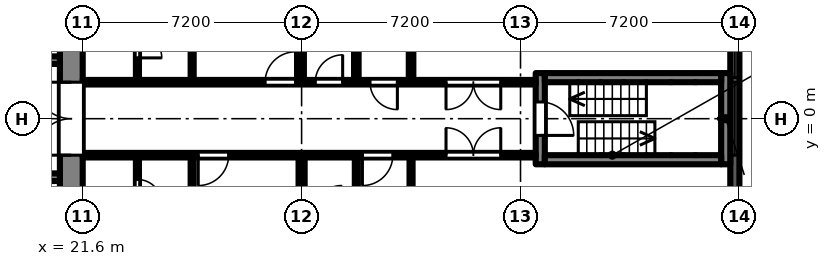
"""IFC4 building model, lengths in metres.
Left out: names, types, materials, properties, quantities, classifications, styles, units other than length and angle.
Written with IfcOpenShell. Run it as: python <this file> out.ifc"""

import sys

from ifc_helpers import new_model, si_unit, direction, frame, frame_2d, origin, place, context, subcontext, project, spatial, rectangle, extrude, element, fill, save


model = new_model("IFC4")
c1 = context("Model", 3, precision=1e-05, world=origin(), true_north=direction((0.0, 1.0)))
c2 = subcontext(c1, "Body", "Model", "MODEL_VIEW")
j1 = project(units=[si_unit("LENGTHUNIT", "METRE"), si_unit("PLANEANGLEUNIT", "RADIAN")], contexts=[c1])
p1 = place(None, origin())
s1 = spatial("IfcSite", under=j1, at=p1, CompositionType="ELEMENT")
p2 = place(p1, origin())
s2 = spatial("IfcBuilding", under=s1, at=p2, CompositionType="ELEMENT")
p3 = place(p2, frame((0.0, 0.0, 53.7)))
s3 = spatial("IfcBuildingStorey", under=s2, at=p3, CompositionType="ELEMENT", Elevation=53.7)
p4 = place(p3, frame((43.05, -2.7, 0.0), z_axis=(0.0, 0.0, 1.0), x_axis=(0.0, 1.0, 0.0)))
e1 = element("IfcWall", 1, at=p4, inside=s3, PredefinedType="SOLIDWALL", context=c2, shape_type="SweptSolid", body=[
    extrude(rectangle(XDim=5.4, YDim=0.3, at=frame_2d((2.7, 0.0))), origin(), (0.0, 0.0, 1.0), 2.1),
])
p5 = place(p4, frame((1.5, 0.0, 0.2)))
e2 = element("IfcOpeningElement", 2, at=p5, cuts=e1, PredefinedType="OPENING", context=c2, shape_type="SweptSolid", body=[
    extrude(rectangle(XDim=2.4, YDim=1.85, at=frame_2d((1.2, 0.925))), frame((0.0, 0.16, 0.0), z_axis=(0.0, -1.0, 0.0), x_axis=(1.0, 0.0, 0.0)), (0.0, 0.0, 1.0), 0.32),
])
p6 = place(p4, frame((4.05, 0.0, 0.2)))
e3 = element("IfcOpeningElement", 3, at=p6, cuts=e1, PredefinedType="OPENING", context=c2, shape_type="SweptSolid", body=[
    extrude(rectangle(XDim=1.2, YDim=1.85, at=frame_2d((0.6, 0.925))), frame((0.0, 0.16, 0.0), z_axis=(0.0, -1.0, 0.0), x_axis=(1.0, 0.0, 0.0)), (0.0, 0.0, 1.0), 0.32),
])
p7 = place(p3, frame((21.225, -7.2, 0.0), z_axis=(0.0, 0.0, 1.0), x_axis=(0.0, 1.0, 0.0)))
e4 = element("IfcWall", 4, at=p7, inside=s3, PredefinedType="SHEAR", context=c2, shape_type="SweptSolid", body=[
    extrude(rectangle(XDim=14.4, YDim=0.75, at=frame_2d((7.2, 0.0))), origin(), (0.0, 0.0, 1.0), 2.575),
])
p8 = place(p7, frame((6.0, 0.0, 0.0)))
e5 = element("IfcOpeningElement", 5, at=p8, cuts=e4, PredefinedType="OPENING", context=c2, shape_type="SweptSolid", body=[
    extrude(rectangle(XDim=2.4, YDim=2.2, at=frame_2d((1.2, 1.1))), frame((0.0, 0.385, 0.0), z_axis=(0.0, -1.0, 0.0), x_axis=(1.0, 0.0, 0.0)), (0.0, 0.0, 1.0), 0.77),
])
p9 = place(p3, frame((7.9, 1.925, 0.0), z_axis=(0.0, 0.0, 1.0), x_axis=(1.0, 0.0, 0.0)))
e6 = element("IfcWall", 6, at=p9, inside=s3, PredefinedType="SHEAR", context=c2, shape_type="SweptSolid", body=[
    extrude(rectangle(XDim=12.95, YDim=0.25, at=frame_2d((6.475, 0.0))), origin(), (0.0, 0.0, 1.0), 2.575),
])
p10 = place(p9, frame((0.525, 0.0, 0.0)))
e7 = element("IfcOpeningElement", 7, at=p10, cuts=e6, PredefinedType="OPENING", context=c2, shape_type="SweptSolid", body=[
    extrude(rectangle(XDim=0.9, YDim=2.1, at=frame_2d((0.45, 1.05))), frame((0.0, 0.135, 0.0), z_axis=(0.0, -1.0, 0.0), x_axis=(1.0, 0.0, 0.0)), (0.0, 0.0, 1.0), 0.27),
])
p11 = place(p9, frame((2.625, 0.0, 0.0)))
e8 = element("IfcOpeningElement", 8, at=p11, cuts=e6, PredefinedType="OPENING", context=c2, shape_type="SweptSolid", body=[
    extrude(rectangle(XDim=1.1, YDim=2.1, at=frame_2d((0.55, 1.05))), frame((0.0, 0.135, 0.0), z_axis=(0.0, -1.0, 0.0), x_axis=(1.0, 0.0, 0.0)), (0.0, 0.0, 1.0), 0.27),
])
p12 = place(p9, frame((6.025, 0.0, 0.0)))
e9 = element("IfcOpeningElement", 9, at=p12, cuts=e6, PredefinedType="OPENING", context=c2, shape_type="SweptSolid", body=[
    extrude(rectangle(XDim=0.9, YDim=2.1, at=frame_2d((0.45, 1.05))), frame((0.0, 0.135, 0.0), z_axis=(0.0, -1.0, 0.0), x_axis=(1.0, 0.0, 0.0)), (0.0, 0.0, 1.0), 0.27),
])
p13 = place(p9, frame((9.325, 0.0, 0.0)))
e10 = element("IfcOpeningElement", 10, at=p13, cuts=e6, PredefinedType="OPENING", context=c2, shape_type="SweptSolid", body=[
    extrude(rectangle(XDim=0.9, YDim=2.1, at=frame_2d((0.45, 1.05))), frame((0.0, 0.135, 0.0), z_axis=(0.0, -1.0, 0.0), x_axis=(1.0, 0.0, 0.0)), (0.0, 0.0, 1.0), 0.27),
])
p14 = place(p3, frame((7.9, -1.925, 0.0), z_axis=(0.0, 0.0, 1.0), x_axis=(1.0, 0.0, 0.0)))
e11 = element("IfcWall", 11, at=p14, inside=s3, PredefinedType="SHEAR", context=c2, shape_type="SweptSolid", body=[
    extrude(rectangle(XDim=12.95, YDim=0.25, at=frame_2d((6.475, 0.0))), origin(), (0.0, 0.0, 1.0), 2.575),
])
p15 = place(p14, frame((4.825, 0.0, 0.0)))
e12 = element("IfcOpeningElement", 12, at=p15, cuts=e11, PredefinedType="OPENING", context=c2, shape_type="SweptSolid", body=[
    extrude(rectangle(XDim=1.1, YDim=2.1, at=frame_2d((0.55, 1.05))), frame((0.0, 0.135, 0.0), z_axis=(0.0, -1.0, 0.0), x_axis=(1.0, 0.0, 0.0)), (0.0, 0.0, 1.0), 0.27),
])
p16 = place(p14, frame((7.025, 0.0, 0.0)))
e13 = element("IfcOpeningElement", 13, at=p16, cuts=e11, PredefinedType="OPENING", context=c2, shape_type="SweptSolid", body=[
    extrude(rectangle(XDim=1.1, YDim=2.1, at=frame_2d((0.55, 1.05))), frame((0.0, 0.135, 0.0), z_axis=(0.0, -1.0, 0.0), x_axis=(1.0, 0.0, 0.0)), (0.0, 0.0, 1.0), 0.27),
])
p17 = place(p14, frame((9.225, 0.0, 0.0)))
e14 = element("IfcOpeningElement", 14, at=p17, cuts=e11, PredefinedType="OPENING", context=c2, shape_type="SweptSolid", body=[
    extrude(rectangle(XDim=1.1, YDim=2.1, at=frame_2d((0.55, 1.05))), frame((0.0, 0.135, 0.0), z_axis=(0.0, -1.0, 0.0), x_axis=(1.0, 0.0, 0.0)), (0.0, 0.0, 1.0), 0.27),
])
p18 = place(p14, frame((0.525, 0.0, 0.0)))
e15 = element("IfcOpeningElement", 15, at=p18, cuts=e11, PredefinedType="OPENING", context=c2, shape_type="SweptSolid", body=[
    extrude(rectangle(XDim=0.9, YDim=2.1, at=frame_2d((0.45, 1.05))), frame((0.0, 0.135, 0.0), z_axis=(0.0, -1.0, 0.0), x_axis=(1.0, 0.0, 0.0)), (0.0, 0.0, 1.0), 0.27),
])
p19 = place(p14, frame((2.625, 0.0, 0.0)))
e16 = element("IfcOpeningElement", 16, at=p19, cuts=e11, PredefinedType="OPENING", context=c2, shape_type="SweptSolid", body=[
    extrude(rectangle(XDim=1.1, YDim=2.1, at=frame_2d((0.55, 1.05))), frame((0.0, 0.135, 0.0), z_axis=(0.0, -1.0, 0.0), x_axis=(1.0, 0.0, 0.0)), (0.0, 0.0, 1.0), 0.27),
])
p20 = place(p3, frame((36.65, -1.5, 0.0), z_axis=(0.0, 0.0, 1.0), x_axis=(0.0, 1.0, 0.0)))
e17 = element("IfcWall", 17, at=p20, inside=s3, PredefinedType="SHEAR", context=c2, shape_type="SweptSolid", body=[
    extrude(rectangle(XDim=3.0, YDim=0.3, at=frame_2d((1.5, 0.0))), origin(), (0.0, 0.0, 1.0), 2.575),
])
p21 = place(p20, frame((0.95, 0.0, 0.0)))
e18 = element("IfcOpeningElement", 18, at=p21, cuts=e17, PredefinedType="OPENING", context=c2, shape_type="SweptSolid", body=[
    extrude(rectangle(XDim=1.1, YDim=2.1, at=frame_2d((0.55, 1.05))), frame((0.0, 0.16, 0.0), z_axis=(0.0, -1.0, 0.0), x_axis=(1.0, 0.0, 0.0)), (0.0, 0.0, 1.0), 0.32),
])
p22 = place(p3, frame((42.75, -1.5, 0.0), z_axis=(0.0, 0.0, 1.0), x_axis=(0.0, 1.0, 0.0)))
e19 = element("IfcWall", 19, at=p22, inside=s3, PredefinedType="SHEAR", context=c2, shape_type="SweptSolid", body=[
    extrude(rectangle(XDim=3.0, YDim=0.3, at=frame_2d((1.5, 0.0))), origin(), (0.0, 0.0, 1.0), 2.575),
])
for number, where, z_axis, x_axis in (
    (20, (36.8, -1.35, 0.0), (0.0, 0.0, 1.0), (1.0, 0.0, 0.0)),
    (21, (36.8, 1.35, 0.0), (0.0, 0.0, 1.0), (1.0, 0.0, 0.0)),
):
    element("IfcWall", number, at=place(p3, frame(where, z_axis=z_axis, x_axis=x_axis)), inside=s3, PredefinedType="SHEAR", context=c2, shape_type="SweptSolid", body=[
        extrude(rectangle(XDim=5.8, YDim=0.3, at=frame_2d((2.9, 0.0))), origin(), (0.0, 0.0, 1.0), 2.575),
    ])
p23 = place(p3, frame((21.6, -1.2, 0.0), z_axis=(0.0, 0.0, 1.0), x_axis=(1.0, 0.0, 0.0)))
e22 = element("IfcWall", 22, at=p23, inside=s3, PredefinedType="PARTITIONING", context=c2, shape_type="SweptSolid", body=[
    extrude(rectangle(XDim=14.9, YDim=0.15, at=frame_2d((7.45, 0.0))), origin(), (0.0, 0.0, 1.0), 2.575),
])
p24 = place(p23, frame((3.8, 0.0, 0.0)))
e23 = element("IfcOpeningElement", 23, at=p24, cuts=e22, PredefinedType="OPENING", context=c2, shape_type="SweptSolid", body=[
    extrude(rectangle(XDim=1.0, YDim=2.1, at=frame_2d((0.5, 1.05))), frame((0.0, 0.085, 0.0), z_axis=(0.0, -1.0, 0.0), x_axis=(1.0, 0.0, 0.0)), (0.0, 0.0, 1.0), 0.17),
])
p25 = place(p23, frame((9.2, 0.0, 0.0)))
e24 = element("IfcOpeningElement", 24, at=p25, cuts=e22, PredefinedType="OPENING", context=c2, shape_type="SweptSolid", body=[
    extrude(rectangle(XDim=1.0, YDim=2.1, at=frame_2d((0.5, 1.05))), frame((0.0, 0.085, 0.0), z_axis=(0.0, -1.0, 0.0), x_axis=(1.0, 0.0, 0.0)), (0.0, 0.0, 1.0), 0.17),
])
p26 = place(p23, frame((11.95, 0.0, 0.0)))
e25 = element("IfcOpeningElement", 25, at=p26, cuts=e22, PredefinedType="OPENING", context=c2, shape_type="SweptSolid", body=[
    extrude(rectangle(XDim=1.8, YDim=2.1, at=frame_2d((0.9, 1.05))), frame((0.0, 0.085, 0.0), z_axis=(0.0, -1.0, 0.0), x_axis=(1.0, 0.0, 0.0)), (0.0, 0.0, 1.0), 0.17),
])
p27 = place(p3, frame((21.6, 1.2, 0.0), z_axis=(0.0, 0.0, 1.0), x_axis=(1.0, 0.0, 0.0)))
e26 = element("IfcWall", 26, at=p27, inside=s3, PredefinedType="PARTITIONING", context=c2, shape_type="SweptSolid", body=[
    extrude(rectangle(XDim=14.9, YDim=0.15, at=frame_2d((7.45, 0.0))), origin(), (0.0, 0.0, 1.0), 2.575),
])
p28 = place(p27, frame((6.0, 0.0, 0.0)))
e27 = element("IfcOpeningElement", 27, at=p28, cuts=e26, PredefinedType="OPENING", context=c2, shape_type="SweptSolid", body=[
    extrude(rectangle(XDim=1.0, YDim=2.1, at=frame_2d((0.5, 1.05))), frame((0.0, 0.085, 0.0), z_axis=(0.0, -1.0, 0.0), x_axis=(1.0, 0.0, 0.0)), (0.0, 0.0, 1.0), 0.17),
])
p29 = place(p27, frame((7.65, 0.0, 0.0)))
e28 = element("IfcOpeningElement", 28, at=p29, cuts=e26, PredefinedType="OPENING", context=c2, shape_type="SweptSolid", body=[
    extrude(rectangle(XDim=0.9, YDim=2.1, at=frame_2d((0.45, 1.05))), frame((0.0, 0.085, 0.0), z_axis=(0.0, -1.0, 0.0), x_axis=(1.0, 0.0, 0.0)), (0.0, 0.0, 1.0), 0.17),
])
p30 = place(p27, frame((9.45, 0.0, 0.0)))
e29 = element("IfcOpeningElement", 29, at=p30, cuts=e26, PredefinedType="OPENING", context=c2, shape_type="SweptSolid", body=[
    extrude(rectangle(XDim=0.9, YDim=2.1, at=frame_2d((0.45, 1.05))), frame((0.0, 0.085, 0.0), z_axis=(0.0, -1.0, 0.0), x_axis=(1.0, 0.0, 0.0)), (0.0, 0.0, 1.0), 0.17),
])
p31 = place(p27, frame((11.95, 0.0, 0.0)))
e30 = element("IfcOpeningElement", 30, at=p31, cuts=e26, PredefinedType="OPENING", context=c2, shape_type="SweptSolid", body=[
    extrude(rectangle(XDim=1.8, YDim=2.1, at=frame_2d((0.9, 1.05))), frame((0.0, 0.085, 0.0), z_axis=(0.0, -1.0, 0.0), x_axis=(1.0, 0.0, 0.0)), (0.0, 0.0, 1.0), 0.17),
])
p32 = place(p3, frame((23.4, -3.65, 0.0), z_axis=(0.0, 0.0, 1.0), x_axis=(0.0, 1.0, 0.0)))
e31 = element("IfcWall", 31, at=p32, inside=s3, PredefinedType="PARTITIONING", context=c2, shape_type="SweptSolid", body=[
    extrude(rectangle(XDim=2.375, YDim=0.1, at=frame_2d((1.188, 0.0))), origin(), (0.0, 0.0, 1.0), 2.575),
])
p33 = place(p32, frame((0.85, 0.0, 0.0)))
e32 = element("IfcOpeningElement", 32, at=p33, cuts=e31, PredefinedType="OPENING", context=c2, shape_type="SweptSolid", body=[
    extrude(rectangle(XDim=0.8, YDim=2.1, at=frame_2d((0.4, 1.05))), frame((0.0, 0.06, 0.0), z_axis=(0.0, -1.0, 0.0), x_axis=(1.0, 0.0, 0.0)), (0.0, 0.0, 1.0), 0.12),
])
p34 = place(p3, frame((23.4, 1.275, 0.0), z_axis=(0.0, 0.0, 1.0), x_axis=(0.0, 1.0, 0.0)))
e33 = element("IfcWall", 33, at=p34, inside=s3, PredefinedType="PARTITIONING", context=c2, shape_type="SweptSolid", body=[
    extrude(rectangle(XDim=2.375, YDim=0.1, at=frame_2d((1.188, 0.0))), origin(), (0.0, 0.0, 1.0), 2.575),
])
p35 = place(p34, frame((0.725, 0.0, 0.0)))
e34 = element("IfcOpeningElement", 34, at=p35, cuts=e33, PredefinedType="OPENING", context=c2, shape_type="SweptSolid", body=[
    extrude(rectangle(XDim=0.8, YDim=2.1, at=frame_2d((0.4, 1.05))), frame((0.0, 0.06, 0.0), z_axis=(0.0, -1.0, 0.0), x_axis=(1.0, 0.0, 0.0)), (0.0, 0.0, 1.0), 0.12),
])
for number, where, z_axis, x_axis in (
    (35, (25.2, -3.55, 0.0), (0.0, 0.0, 1.0), (0.0, 1.0, 0.0)),
    (36, (25.2, 1.275, 0.0), (0.0, 0.0, 1.0), (0.0, 1.0, 0.0)),
):
    element("IfcWall", number, at=place(p3, frame(where, z_axis=z_axis, x_axis=x_axis)), inside=s3, PredefinedType="PARTITIONING", context=c2, shape_type="SweptSolid", body=[
        extrude(rectangle(XDim=2.275, YDim=0.1, at=frame_2d((1.138, 0.0))), origin(), (0.0, 0.0, 1.0), 2.575),
    ])
p36 = place(p3, frame((28.8, -6.9, 0.0), z_axis=(0.0, 0.0, 1.0), x_axis=(0.0, 1.0, 0.0)))
e37 = element("IfcWall", 37, at=p36, inside=s3, PredefinedType="PARTITIONING", context=c2, shape_type="SweptSolid", body=[
    extrude(rectangle(XDim=5.625, YDim=0.2, at=frame_2d((2.812, 0.0))), origin(), (0.0, 0.0, 1.0), 2.575),
])
p37 = place(p3, frame((28.8, 1.275, 0.0), z_axis=(0.0, 0.0, 1.0), x_axis=(0.0, 1.0, 0.0)))
e38 = element("IfcWall", 38, at=p37, inside=s3, PredefinedType="PARTITIONING", context=c2, shape_type="SweptSolid", body=[
    extrude(rectangle(XDim=5.625, YDim=0.15, at=frame_2d((2.812, 0.0))), origin(), (0.0, 0.0, 1.0), 2.575),
])
p38 = place(p3, frame((30.6, -2.95, 0.0), z_axis=(0.0, 0.0, 1.0), x_axis=(0.0, 1.0, 0.0)))
e39 = element("IfcWall", 39, at=p38, inside=s3, PredefinedType="PARTITIONING", context=c2, shape_type="SweptSolid", body=[
    extrude(rectangle(XDim=1.675, YDim=0.1, at=frame_2d((0.837, 0.0))), origin(), (0.0, 0.0, 1.0), 2.575),
])
p39 = place(p3, frame((30.6, 1.275, 0.0), z_axis=(0.0, 0.0, 1.0), x_axis=(0.0, 1.0, 0.0)))
e40 = element("IfcWall", 40, at=p39, inside=s3, PredefinedType="PARTITIONING", context=c2, shape_type="SweptSolid", body=[
    extrude(rectangle(XDim=5.625, YDim=0.15, at=frame_2d((2.812, 0.0))), origin(), (0.0, 0.0, 1.0), 2.575),
])
p40 = place(p3, frame((32.4, -6.9, 0.0), z_axis=(0.0, 0.0, 1.0), x_axis=(0.0, 1.0, 0.0)))
e41 = element("IfcWall", 41, at=p40, inside=s3, PredefinedType="PARTITIONING", context=c2, shape_type="SweptSolid", body=[
    extrude(rectangle(XDim=5.625, YDim=0.1, at=frame_2d((2.812, 0.0))), origin(), (0.0, 0.0, 1.0), 2.575),
])
p41 = place(p3, frame((32.4, 1.275, 0.0), z_axis=(0.0, 0.0, 1.0), x_axis=(0.0, 1.0, 0.0)))
e42 = element("IfcWall", 42, at=p41, inside=s3, PredefinedType="PARTITIONING", context=c2, shape_type="SweptSolid", body=[
    extrude(rectangle(XDim=5.625, YDim=0.15, at=frame_2d((2.812, 0.0))), origin(), (0.0, 0.0, 1.0), 2.575),
])
p42 = place(p5, origin())
e43 = element("IfcWindow", 43, at=p42, inside=s3, PartitioningType="SINGLE_PANEL", PredefinedType="WINDOW", context=c2, shape_type="SweptSolid", body=[
    extrude(rectangle(XDim=2.4, YDim=1.85, at=frame_2d((1.2, 0.925))), frame((0.0, 0.03, 0.0), z_axis=(0.0, -1.0, 0.0), x_axis=(1.0, 0.0, 0.0)), (0.0, 0.0, 1.0), 0.06),
])
fill(e2, e43)
p43 = place(p6, origin())
e44 = element("IfcWindow", 44, at=p43, inside=s3, PartitioningType="SINGLE_PANEL", PredefinedType="WINDOW", context=c2, shape_type="SweptSolid", body=[
    extrude(rectangle(XDim=1.2, YDim=1.85, at=frame_2d((0.6, 0.925))), frame((0.0, 0.03, 0.0), z_axis=(0.0, -1.0, 0.0), x_axis=(1.0, 0.0, 0.0)), (0.0, 0.0, 1.0), 0.06),
])
fill(e3, e44)
p44 = place(p8, origin())
e45 = element("IfcDoor", 45, at=p44, inside=s3, OperationType="DOUBLE_DOOR_DOUBLE_SWING", PredefinedType="DOOR", context=c2, shape_type="SweptSolid", body=[
    extrude(rectangle(XDim=2.4, YDim=2.2, at=frame_2d((1.2, 1.1))), frame((0.0, 0.025, 0.0), z_axis=(0.0, -1.0, 0.0), x_axis=(1.0, 0.0, 0.0)), (0.0, 0.0, 1.0), 0.05),
])
fill(e5, e45)
p45 = place(p21, frame((1.1, 0.0, 0.0), z_axis=(0.0, 0.0, 1.0), x_axis=(-1.0, 0.0, 0.0)))
e46 = element("IfcDoor", 46, at=p45, inside=s3, OperationType="SINGLE_SWING_RIGHT", PredefinedType="DOOR", context=c2, shape_type="SweptSolid", body=[
    extrude(rectangle(XDim=1.1, YDim=2.1, at=frame_2d((0.55, 1.05))), frame((0.0, 0.025, 0.0), z_axis=(0.0, -1.0, 0.0), x_axis=(1.0, 0.0, 0.0)), (0.0, 0.0, 1.0), 0.05),
])
fill(e18, e46)
p46 = place(p35, frame((0.8, 0.0, 0.0), z_axis=(0.0, 0.0, 1.0), x_axis=(-1.0, 0.0, 0.0)))
e47 = element("IfcDoor", 47, at=p46, inside=s3, OperationType="SINGLE_SWING_RIGHT", PredefinedType="DOOR", context=c2, shape_type="SweptSolid", body=[
    extrude(rectangle(XDim=0.8, YDim=2.1, at=frame_2d((0.4, 1.05))), frame((0.0, 0.025, 0.0), z_axis=(0.0, -1.0, 0.0), x_axis=(1.0, 0.0, 0.0)), (0.0, 0.0, 1.0), 0.05),
])
fill(e34, e47)
p47 = place(p28, origin())
e48 = element("IfcDoor", 48, at=p47, inside=s3, OperationType="SINGLE_SWING_RIGHT", PredefinedType="DOOR", context=c2, shape_type="SweptSolid", body=[
    extrude(rectangle(XDim=1.0, YDim=2.1, at=frame_2d((0.5, 1.05))), frame((0.0, 0.025, 0.0), z_axis=(0.0, -1.0, 0.0), x_axis=(1.0, 0.0, 0.0)), (0.0, 0.0, 1.0), 0.05),
])
fill(e27, e48)
p48 = place(p29, origin())
e49 = element("IfcDoor", 49, at=p48, inside=s3, OperationType="SINGLE_SWING_RIGHT", PredefinedType="DOOR", context=c2, shape_type="SweptSolid", body=[
    extrude(rectangle(XDim=0.9, YDim=2.1, at=frame_2d((0.45, 1.05))), frame((0.0, 0.025, 0.0), z_axis=(0.0, -1.0, 0.0), x_axis=(1.0, 0.0, 0.0)), (0.0, 0.0, 1.0), 0.05),
])
fill(e28, e49)
p49 = place(p30, frame((0.9, 0.0, 0.0), z_axis=(0.0, 0.0, 1.0), x_axis=(-1.0, 0.0, 0.0)))
e50 = element("IfcDoor", 50, at=p49, inside=s3, OperationType="SINGLE_SWING_LEFT", PredefinedType="DOOR", context=c2, shape_type="SweptSolid", body=[
    extrude(rectangle(XDim=0.9, YDim=2.1, at=frame_2d((0.45, 1.05))), frame((0.0, 0.025, 0.0), z_axis=(0.0, -1.0, 0.0), x_axis=(1.0, 0.0, 0.0)), (0.0, 0.0, 1.0), 0.05),
])
fill(e29, e50)
p50 = place(p31, frame((1.8, 0.0, 0.0), z_axis=(0.0, 0.0, 1.0), x_axis=(-1.0, 0.0, 0.0)))
e51 = element("IfcDoor", 51, at=p50, inside=s3, OperationType="DOUBLE_DOOR_DOUBLE_SWING", PredefinedType="DOOR", context=c2, shape_type="SweptSolid", body=[
    extrude(rectangle(XDim=1.8, YDim=2.1, at=frame_2d((0.9, 1.05))), frame((0.0, 0.025, 0.0), z_axis=(0.0, -1.0, 0.0), x_axis=(1.0, 0.0, 0.0)), (0.0, 0.0, 1.0), 0.05),
])
fill(e30, e51)
p51 = place(p33, frame((0.8, 0.0, 0.0), z_axis=(0.0, 0.0, 1.0), x_axis=(-1.0, 0.0, 0.0)))
e52 = element("IfcDoor", 52, at=p51, inside=s3, OperationType="SINGLE_SWING_RIGHT", PredefinedType="DOOR", context=c2, shape_type="SweptSolid", body=[
    extrude(rectangle(XDim=0.8, YDim=2.1, at=frame_2d((0.4, 1.05))), frame((0.0, 0.025, 0.0), z_axis=(0.0, -1.0, 0.0), x_axis=(1.0, 0.0, 0.0)), (0.0, 0.0, 1.0), 0.05),
])
fill(e32, e52)
p52 = place(p24, frame((1.0, 0.0, 0.0), z_axis=(0.0, 0.0, 1.0), x_axis=(-1.0, 0.0, 0.0)))
e53 = element("IfcDoor", 53, at=p52, inside=s3, OperationType="SINGLE_SWING_RIGHT", PredefinedType="DOOR", context=c2, shape_type="SweptSolid", body=[
    extrude(rectangle(XDim=1.0, YDim=2.1, at=frame_2d((0.5, 1.05))), frame((0.0, 0.025, 0.0), z_axis=(0.0, -1.0, 0.0), x_axis=(1.0, 0.0, 0.0)), (0.0, 0.0, 1.0), 0.05),
])
fill(e23, e53)
p53 = place(p25, frame((1.0, 0.0, 0.0), z_axis=(0.0, 0.0, 1.0), x_axis=(-1.0, 0.0, 0.0)))
e54 = element("IfcDoor", 54, at=p53, inside=s3, OperationType="SINGLE_SWING_RIGHT", PredefinedType="DOOR", context=c2, shape_type="SweptSolid", body=[
    extrude(rectangle(XDim=1.0, YDim=2.1, at=frame_2d((0.5, 1.05))), frame((0.0, 0.025, 0.0), z_axis=(0.0, -1.0, 0.0), x_axis=(1.0, 0.0, 0.0)), (0.0, 0.0, 1.0), 0.05),
])
fill(e24, e54)
p54 = place(p26, origin())
e55 = element("IfcDoor", 55, at=p54, inside=s3, OperationType="DOUBLE_DOOR_DOUBLE_SWING", PredefinedType="DOOR", context=c2, shape_type="SweptSolid", body=[
    extrude(rectangle(XDim=1.8, YDim=2.1, at=frame_2d((0.9, 1.05))), frame((0.0, 0.025, 0.0), z_axis=(0.0, -1.0, 0.0), x_axis=(1.0, 0.0, 0.0)), (0.0, 0.0, 1.0), 0.05),
])
fill(e25, e55)
save(model, sys.argv[1])
